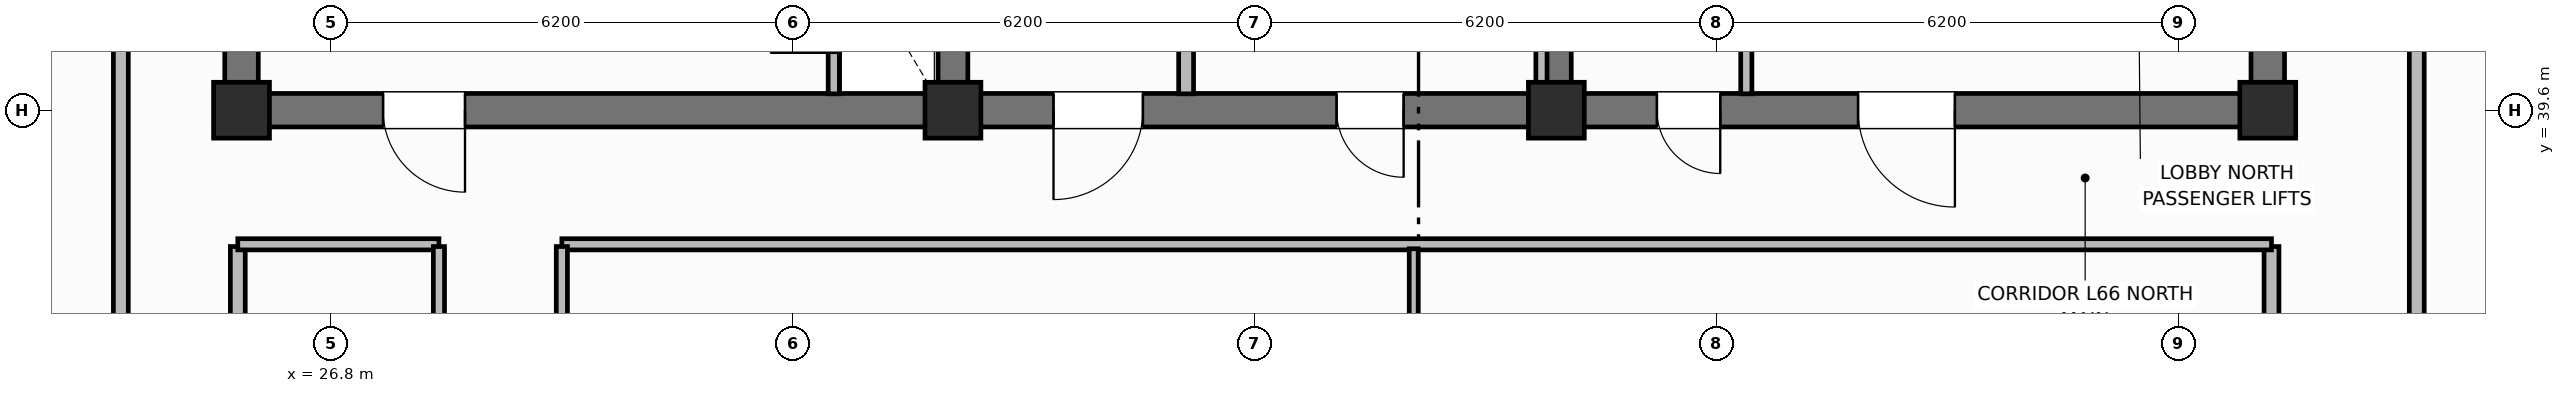
"""IFC4 building model, lengths in metres.
Left out: names, types, materials, properties, quantities, classifications, styles, units other than length and angle.
Written with IfcOpenShell. Run it as: python <this file> out.ifc"""

import sys

from ifc_helpers import new_model, si_unit, direction, frame, frame_2d, origin, origin_2d, place, context, subcontext, project, spatial, rectangle, extrude, element, fill, save


model = new_model("IFC4")
c1 = context("Model", 3, precision=1e-05, world=origin(), true_north=direction((0.0, 1.0)))
c2 = subcontext(c1, "Body", "Model", "MODEL_VIEW")
j1 = project(units=[si_unit("LENGTHUNIT", "METRE"), si_unit("PLANEANGLEUNIT", "RADIAN")], contexts=[c1])
p1 = place(None, origin())
s1 = spatial("IfcSite", under=j1, at=p1, CompositionType="ELEMENT")
p2 = place(p1, origin())
s2 = spatial("IfcBuilding", under=s1, at=p2, CompositionType="ELEMENT")
p3 = place(p2, frame((0.0, 0.0, 263.9)))
s3 = spatial("IfcBuildingStorey", under=s2, at=p3, CompositionType="ELEMENT", Elevation=263.9)
for number, where, z_axis, x_axis in (
    (1, (25.6, 39.825, 0.0), (0.0, 0.0, 1.0), (0.0, 1.0, 0.0)),
    (2, (52.8, 39.825, 0.0), (0.0, 0.0, 1.0), (0.0, 1.0, 0.0)),
):
    element("IfcWall", number, at=place(p3, frame(where, z_axis=z_axis, x_axis=x_axis)), inside=s3, PredefinedType="SHEAR", context=c2, shape_type="SweptSolid", body=[
        extrude(rectangle(XDim=5.75, YDim=0.45, at=frame_2d((2.875, 0.0))), origin(), (0.0, 0.0, 1.0), 3.7),
    ])
p4 = place(p3, frame((52.8, 39.6, 0.0), z_axis=(0.0, 0.0, 1.0), x_axis=(-1.0, 0.0, 0.0)))
e3 = element("IfcWall", 3, at=p4, inside=s3, PredefinedType="SHEAR", context=c2, shape_type="SweptSolid", body=[
    extrude(rectangle(XDim=27.2, YDim=0.45, at=frame_2d((13.6, 0.0))), origin(), (0.0, 0.0, 1.0), 3.7),
])
p5 = place(p4, frame((24.2, 0.0, 0.0)))
e4 = element("IfcOpeningElement", 4, at=p5, cuts=e3, PredefinedType="OPENING", context=c2, shape_type="SweptSolid", body=[
    extrude(rectangle(XDim=1.1, YDim=2.15, at=frame_2d((0.55, 1.075))), frame((0.0, 0.235, 0.0), z_axis=(0.0, -1.0, 0.0), x_axis=(1.0, 0.0, 0.0)), (0.0, 0.0, 1.0), 0.47),
])
p6 = place(p4, frame((15.1, 0.0, 0.0)))
e5 = element("IfcOpeningElement", 5, at=p6, cuts=e3, PredefinedType="OPENING", context=c2, shape_type="SweptSolid", body=[
    extrude(rectangle(XDim=1.2, YDim=2.15, at=frame_2d((0.6, 1.075))), frame((0.0, 0.235, 0.0), z_axis=(0.0, -1.0, 0.0), x_axis=(1.0, 0.0, 0.0)), (0.0, 0.0, 1.0), 0.47),
])
p7 = place(p4, frame((11.6, 0.0, 0.0)))
e6 = element("IfcOpeningElement", 6, at=p7, cuts=e3, PredefinedType="OPENING", context=c2, shape_type="SweptSolid", body=[
    extrude(rectangle(XDim=0.9, YDim=2.1, at=frame_2d((0.45, 1.05))), frame((0.0, 0.235, 0.0), z_axis=(0.0, -1.0, 0.0), x_axis=(1.0, 0.0, 0.0)), (0.0, 0.0, 1.0), 0.47),
])
p8 = place(p4, frame((7.35, 0.0, 0.0)))
e7 = element("IfcOpeningElement", 7, at=p8, cuts=e3, PredefinedType="OPENING", context=c2, shape_type="SweptSolid", body=[
    extrude(rectangle(XDim=0.85, YDim=2.1, at=frame_2d((0.425, 1.05))), frame((0.0, 0.235, 0.0), z_axis=(0.0, -1.0, 0.0), x_axis=(1.0, 0.0, 0.0)), (0.0, 0.0, 1.0), 0.47),
])
p9 = place(p4, frame((4.2, 0.0, 0.0)))
e8 = element("IfcOpeningElement", 8, at=p9, cuts=e3, PredefinedType="OPENING", context=c2, shape_type="SweptSolid", body=[
    extrude(rectangle(XDim=1.3, YDim=2.2, at=frame_2d((0.65, 1.1))), frame((0.0, 0.235, 0.0), z_axis=(0.0, -1.0, 0.0), x_axis=(1.0, 0.0, 0.0)), (0.0, 0.0, 1.0), 0.47),
])
for number, where, z_axis, x_axis in (
    (9, (35.15, 39.825, 0.0), (0.0, 0.0, 1.0), (0.0, 1.0, 0.0)),
    (10, (43.25, 39.825, 0.0), (0.0, 0.0, 1.0), (0.0, 1.0, 0.0)),
):
    element("IfcWall", number, at=place(p3, frame(where, z_axis=z_axis, x_axis=x_axis)), inside=s3, PredefinedType="SHEAR", context=c2, shape_type="SweptSolid", body=[
        extrude(rectangle(XDim=5.75, YDim=0.4, at=frame_2d((2.875, 0.0))), origin(), (0.0, 0.0, 1.0), 3.7),
    ])
for number, where, z_axis, x_axis in (
    (11, (25.6, 39.6, 0.0), (0.0, 0.0, 1.0), (1.0, 0.0, 0.0)),
    (12, (35.15, 39.6, 0.0), (0.0, 0.0, 1.0), (1.0, 0.0, 0.0)),
    (13, (43.25, 39.6, 0.0), (0.0, 0.0, 1.0), (1.0, 0.0, 0.0)),
    (14, (52.8, 39.6, 0.0), (0.0, 0.0, 1.0), (1.0, 0.0, 0.0)),
):
    element("IfcColumn", number, at=place(p3, frame(where, z_axis=z_axis, x_axis=x_axis)), inside=s3, PredefinedType="COLUMN", context=c2, shape_type="SweptSolid", body=[
        extrude(rectangle(XDim=0.75, YDim=0.75, at=origin_2d()), origin(), (0.0, 0.0, 1.0), 3.7),
    ])
p10 = place(p3, frame((33.55, 39.82, 0.0), z_axis=(0.0, 0.0, 1.0), x_axis=(0.0, 1.0, 0.0)))
e15 = element("IfcWall", 15, at=p10, inside=s3, PredefinedType="PARTITIONING", context=c2, shape_type="SweptSolid", body=[
    extrude(rectangle(XDim=2.13, YDim=0.15, at=frame_2d((1.065, 0.0))), origin(), (0.0, 0.0, 1.0), 2.56),
])
p11 = place(p10, frame((0.55, 0.0, 0.0)))
e16 = element("IfcOpeningElement", 16, at=p11, cuts=e15, PredefinedType="OPENING", context=c2, shape_type="SweptSolid", body=[
    extrude(rectangle(XDim=0.85, YDim=2.05, at=frame_2d((0.425, 1.025))), frame((0.0, 0.085, 0.0), z_axis=(0.0, -1.0, 0.0), x_axis=(1.0, 0.0, 0.0)), (0.0, 0.0, 1.0), 0.17),
])
p12 = place(p3, frame((38.28, 39.82, 0.0), z_axis=(0.0, 0.0, 1.0), x_axis=(0.0, 1.0, 0.0)))
e17 = element("IfcWall", 17, at=p12, inside=s3, PredefinedType="PARTITIONING", context=c2, shape_type="SweptSolid", body=[
    extrude(rectangle(XDim=5.63, YDim=0.2, at=frame_2d((2.815, 0.0))), origin(), (0.0, 0.0, 1.0), 2.56),
])
for number, where, z_axis, x_axis in (
    (18, (43.05, 39.82, 0.0), (0.0, 0.0, 1.0), (0.0, 1.0, 0.0)),
    (19, (45.8, 39.82, 0.0), (0.0, 0.0, 1.0), (0.0, 1.0, 0.0)),
):
    element("IfcWall", number, at=place(p3, frame(where, z_axis=z_axis, x_axis=x_axis)), inside=s3, PredefinedType="PARTITIONING", context=c2, shape_type="SweptSolid", body=[
        extrude(rectangle(XDim=5.63, YDim=0.15, at=frame_2d((2.815, 0.0))), origin(), (0.0, 0.0, 1.0), 2.56),
    ])
for number, where, z_axis, x_axis in (
    (20, (25.55, 18.63, 0.0), (0.0, 0.0, 1.0), (0.0, 1.0, 0.0)),
    (21, (52.85, 18.63, 0.0), (0.0, 0.0, 1.0), (0.0, 1.0, 0.0)),
):
    element("IfcWall", number, at=place(p3, frame(where, z_axis=z_axis, x_axis=x_axis)), inside=s3, PredefinedType="PARTITIONING", context=c2, shape_type="SweptSolid", body=[
        extrude(rectangle(XDim=19.14, YDim=0.2, at=frame_2d((9.57, 0.0))), origin(), (0.0, 0.0, 1.0), 2.56),
    ])
p13 = place(p3, frame((25.55, 37.8, 0.0), z_axis=(0.0, 0.0, 1.0), x_axis=(1.0, 0.0, 0.0)))
e22 = element("IfcWall", 22, at=p13, inside=s3, PredefinedType="PARTITIONING", context=c2, shape_type="SweptSolid", body=[
    extrude(rectangle(XDim=2.7, YDim=0.15, at=frame_2d((1.35, 0.0))), origin(), (0.0, 0.0, 1.0), 2.56),
])
p14 = place(p3, frame((29.9, 37.8, 0.0), z_axis=(0.0, 0.0, 1.0), x_axis=(1.0, 0.0, 0.0)))
e23 = element("IfcWall", 23, at=p14, inside=s3, PredefinedType="PARTITIONING", context=c2, shape_type="SweptSolid", body=[
    extrude(rectangle(XDim=22.95, YDim=0.15, at=frame_2d((11.475, 0.0))), origin(), (0.0, 0.0, 1.0), 2.56),
])
p15 = place(p3, frame((41.335, 25.56, 0.0), z_axis=(0.0, 0.0, 1.0), x_axis=(0.0, 1.0, 0.0)))
e24 = element("IfcWall", 24, at=p15, inside=s3, PredefinedType="PARTITIONING", context=c2, shape_type="SweptSolid", body=[
    extrude(rectangle(XDim=12.18, YDim=0.12, at=frame_2d((6.09, 0.0))), origin(), (0.0, 0.0, 1.0), 2.56),
])
p16 = place(p15, frame((2.0, 0.0, 0.0)))
e25 = element("IfcOpeningElement", 25, at=p16, cuts=e24, PredefinedType="OPENING", context=c2, shape_type="SweptSolid", body=[
    extrude(rectangle(XDim=0.9, YDim=2.1, at=frame_2d((0.45, 1.05))), frame((0.0, 0.07, 0.0), z_axis=(0.0, -1.0, 0.0), x_axis=(1.0, 0.0, 0.0)), (0.0, 0.0, 1.0), 0.14),
])
p17 = place(p3, frame((28.25, 18.63, 0.0), z_axis=(0.0, 0.0, 1.0), x_axis=(0.0, 1.0, 0.0)))
e26 = element("IfcWall", 26, at=p17, inside=s3, PredefinedType="PARTITIONING", context=c2, shape_type="SweptSolid", body=[
    extrude(rectangle(XDim=19.14, YDim=0.15, at=frame_2d((9.57, 0.0))), origin(), (0.0, 0.0, 1.0), 2.56),
])
p18 = place(p17, frame((3.0, 0.0, 0.0)))
e27 = element("IfcOpeningElement", 27, at=p18, cuts=e26, PredefinedType="OPENING", context=c2, shape_type="SweptSolid", body=[
    extrude(rectangle(XDim=0.9, YDim=2.1, at=frame_2d((0.45, 1.05))), frame((0.0, 0.085, 0.0), z_axis=(0.0, -1.0, 0.0), x_axis=(1.0, 0.0, 0.0)), (0.0, 0.0, 1.0), 0.17),
])
p19 = place(p17, frame((11.5, 0.0, 0.0)))
e28 = element("IfcOpeningElement", 28, at=p19, cuts=e26, PredefinedType="OPENING", context=c2, shape_type="SweptSolid", body=[
    extrude(rectangle(XDim=0.9, YDim=2.1, at=frame_2d((0.45, 1.05))), frame((0.0, 0.085, 0.0), z_axis=(0.0, -1.0, 0.0), x_axis=(1.0, 0.0, 0.0)), (0.0, 0.0, 1.0), 0.17),
])
p20 = place(p3, frame((29.9, 18.63, 0.0), z_axis=(0.0, 0.0, 1.0), x_axis=(0.0, 1.0, 0.0)))
e29 = element("IfcWall", 29, at=p20, inside=s3, PredefinedType="PARTITIONING", context=c2, shape_type="SweptSolid", body=[
    extrude(rectangle(XDim=19.14, YDim=0.15, at=frame_2d((9.57, 0.0))), origin(), (0.0, 0.0, 1.0), 2.56),
])
p21 = place(p20, frame((2.2, 0.0, 0.0)))
e30 = element("IfcOpeningElement", 30, at=p21, cuts=e29, PredefinedType="OPENING", context=c2, shape_type="SweptSolid", body=[
    extrude(rectangle(XDim=1.0, YDim=2.15, at=frame_2d((0.5, 1.075))), frame((0.0, 0.085, 0.0), z_axis=(0.0, -1.0, 0.0), x_axis=(1.0, 0.0, 0.0)), (0.0, 0.0, 1.0), 0.17),
])
p22 = place(p20, frame((8.89, 0.0, 0.0)))
e31 = element("IfcOpeningElement", 31, at=p22, cuts=e29, PredefinedType="OPENING", context=c2, shape_type="SweptSolid", body=[
    extrude(rectangle(XDim=1.0, YDim=2.15, at=frame_2d((0.5, 1.075))), frame((0.0, 0.085, 0.0), z_axis=(0.0, -1.0, 0.0), x_axis=(1.0, 0.0, 0.0)), (0.0, 0.0, 1.0), 0.17),
])
p23 = place(p3, frame((23.98, 9.95, 0.0), z_axis=(0.0, 0.0, 1.0), x_axis=(0.0, 1.0, 0.0)))
e32 = element("IfcWall", 32, at=p23, inside=s3, PredefinedType="PARTITIONING", context=c2, shape_type="SweptSolid", body=[
    extrude(rectangle(XDim=36.5, YDim=0.2, at=frame_2d((18.25, 0.0))), origin(), (0.0, 0.0, 1.0), 2.56),
])
p24 = place(p23, frame((3.25, 0.0, 0.0)))
e33 = element("IfcOpeningElement", 33, at=p24, cuts=e32, PredefinedType="OPENING", context=c2, shape_type="SweptSolid", body=[
    extrude(rectangle(XDim=1.0, YDim=2.15, at=frame_2d((0.5, 1.075))), frame((0.0, 0.11, 0.0), z_axis=(0.0, -1.0, 0.0), x_axis=(1.0, 0.0, 0.0)), (0.0, 0.0, 1.0), 0.22),
])
p25 = place(p3, frame((54.8, 9.95, 0.0), z_axis=(0.0, 0.0, 1.0), x_axis=(0.0, 1.0, 0.0)))
e34 = element("IfcWall", 34, at=p25, inside=s3, PredefinedType="PARTITIONING", context=c2, shape_type="SweptSolid", body=[
    extrude(rectangle(XDim=36.5, YDim=0.2, at=frame_2d((18.25, 0.0))), origin(), (0.0, 0.0, 1.0), 2.56),
])
p26 = place(p25, frame((3.25, 0.0, 0.0)))
e35 = element("IfcOpeningElement", 35, at=p26, cuts=e34, PredefinedType="OPENING", context=c2, shape_type="SweptSolid", body=[
    extrude(rectangle(XDim=1.0, YDim=2.15, at=frame_2d((0.5, 1.075))), frame((0.0, 0.11, 0.0), z_axis=(0.0, -1.0, 0.0), x_axis=(1.0, 0.0, 0.0)), (0.0, 0.0, 1.0), 0.22),
])
p27 = place(p11, origin())
e36 = element("IfcDoor", 36, at=p27, inside=s3, OperationType="SINGLE_SWING_LEFT", PredefinedType="TRAPDOOR", context=c2, shape_type="SweptSolid", body=[
    extrude(rectangle(XDim=0.85, YDim=2.05, at=frame_2d((0.425, 1.025))), frame((0.0, 0.025, 0.0), z_axis=(0.0, -1.0, 0.0), x_axis=(1.0, 0.0, 0.0)), (0.0, 0.0, 1.0), 0.05),
])
fill(e16, e36)
p28 = place(p5, origin())
e37 = element("IfcDoor", 37, at=p28, inside=s3, OperationType="SINGLE_SWING_LEFT", PredefinedType="DOOR", context=c2, shape_type="SweptSolid", body=[
    extrude(rectangle(XDim=1.1, YDim=2.15, at=frame_2d((0.55, 1.075))), frame((0.0, 0.025, 0.0), z_axis=(0.0, -1.0, 0.0), x_axis=(1.0, 0.0, 0.0)), (0.0, 0.0, 1.0), 0.05),
])
fill(e4, e37)
p29 = place(p6, origin())
e38 = element("IfcDoor", 38, at=p29, inside=s3, OperationType="SINGLE_SWING_RIGHT", PredefinedType="DOOR", context=c2, shape_type="SweptSolid", body=[
    extrude(rectangle(XDim=1.2, YDim=2.15, at=frame_2d((0.6, 1.075))), frame((0.0, 0.025, 0.0), z_axis=(0.0, -1.0, 0.0), x_axis=(1.0, 0.0, 0.0)), (0.0, 0.0, 1.0), 0.05),
])
fill(e5, e38)
p30 = place(p7, origin())
e39 = element("IfcDoor", 39, at=p30, inside=s3, OperationType="SINGLE_SWING_LEFT", PredefinedType="DOOR", context=c2, shape_type="SweptSolid", body=[
    extrude(rectangle(XDim=0.9, YDim=2.1, at=frame_2d((0.45, 1.05))), frame((0.0, 0.025, 0.0), z_axis=(0.0, -1.0, 0.0), x_axis=(1.0, 0.0, 0.0)), (0.0, 0.0, 1.0), 0.05),
])
fill(e6, e39)
p31 = place(p8, origin())
e40 = element("IfcDoor", 40, at=p31, inside=s3, OperationType="SINGLE_SWING_LEFT", PredefinedType="DOOR", context=c2, shape_type="SweptSolid", body=[
    extrude(rectangle(XDim=0.85, YDim=2.1, at=frame_2d((0.425, 1.05))), frame((0.0, 0.025, 0.0), z_axis=(0.0, -1.0, 0.0), x_axis=(1.0, 0.0, 0.0)), (0.0, 0.0, 1.0), 0.05),
])
fill(e7, e40)
p32 = place(p9, origin())
e41 = element("IfcDoor", 41, at=p32, inside=s3, OperationType="SINGLE_SWING_LEFT", PredefinedType="DOOR", context=c2, shape_type="SweptSolid", body=[
    extrude(rectangle(XDim=1.3, YDim=2.2, at=frame_2d((0.65, 1.1))), frame((0.0, 0.025, 0.0), z_axis=(0.0, -1.0, 0.0), x_axis=(1.0, 0.0, 0.0)), (0.0, 0.0, 1.0), 0.05),
])
fill(e8, e41)
save(model, sys.argv[1])
